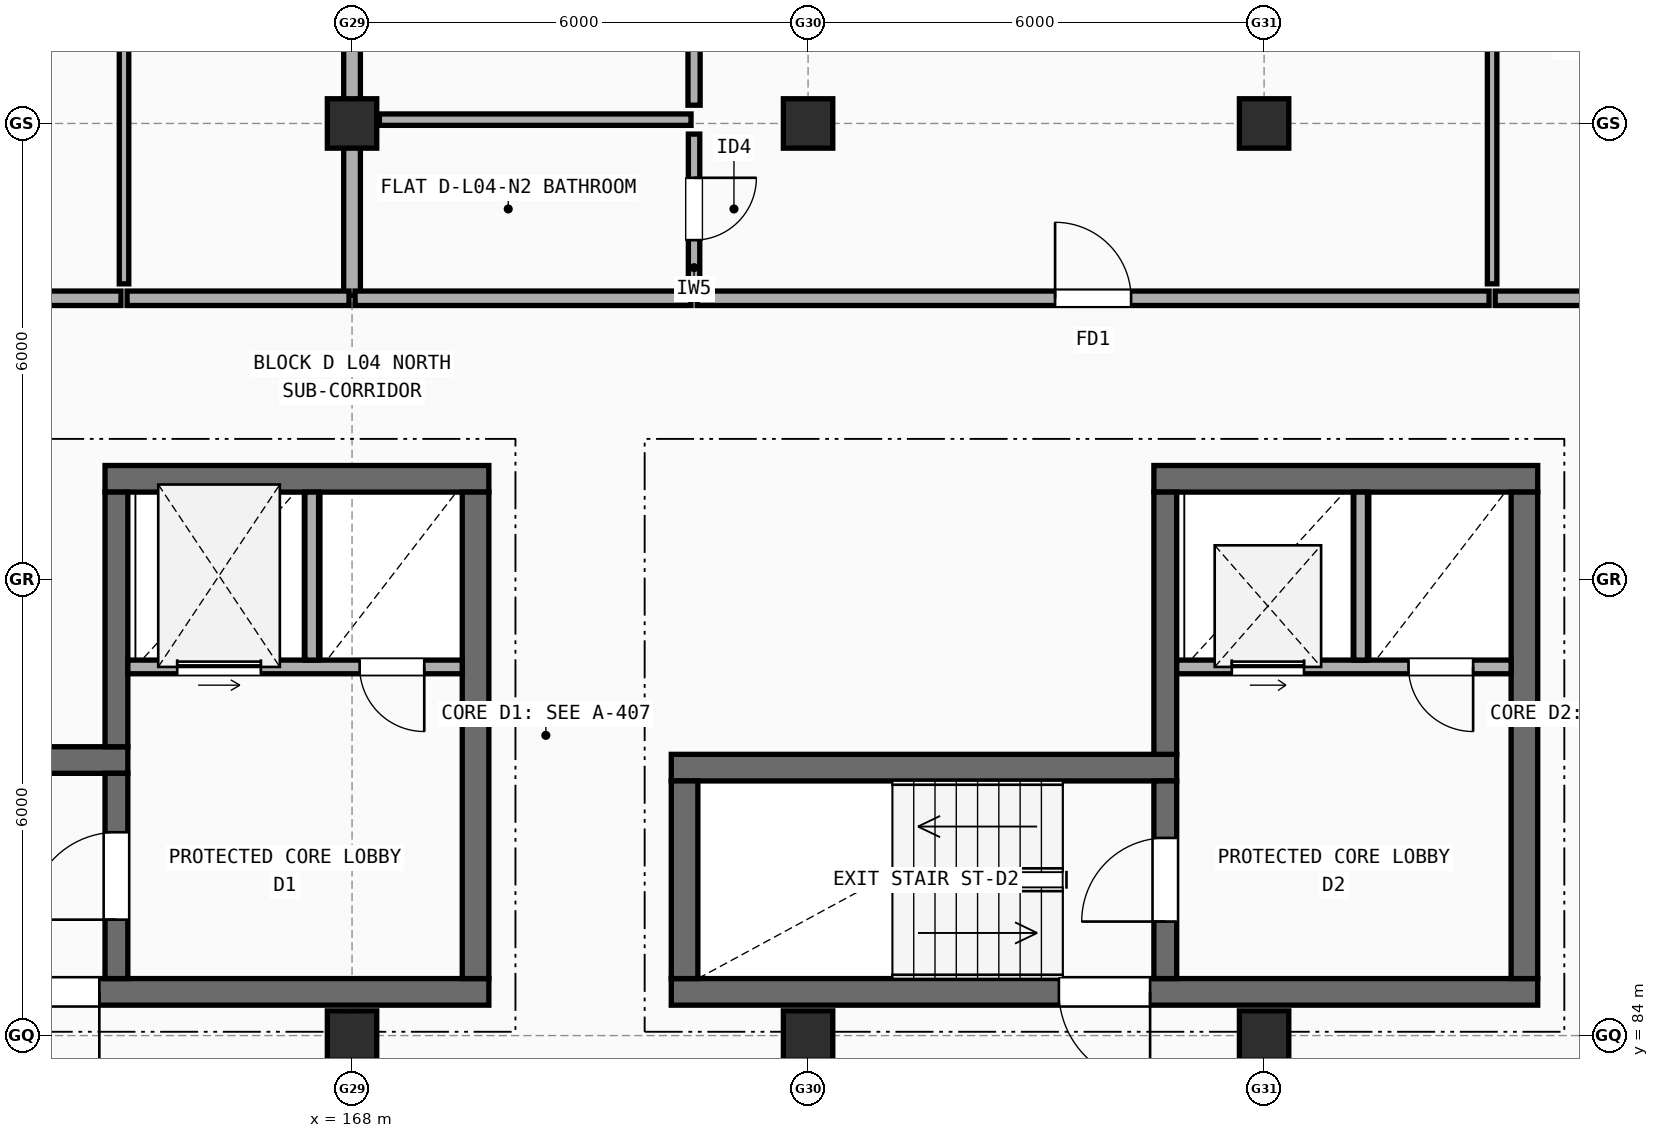
"""IFC4 building model, lengths in metres.
Left out: names, types, materials, properties, quantities, classifications, styles, units other than length and angle.
Written with IfcOpenShell. Run it as: python <this file> out.ifc"""

import sys

from ifc_helpers import new_model, si_unit, direction, frame, frame_2d, origin, origin_2d, place, context, subcontext, project, spatial, rectangle, extrude, element, fill, save


model = new_model("IFC4")
c1 = context("Model", 3, precision=1e-05, world=origin(), true_north=direction((0.0, 1.0)))
c2 = subcontext(c1, "Body", "Model", "MODEL_VIEW")
j1 = project(units=[si_unit("LENGTHUNIT", "METRE"), si_unit("PLANEANGLEUNIT", "RADIAN")], contexts=[c1])
p1 = place(None, origin())
s1 = spatial("IfcSite", under=j1, at=p1, CompositionType="ELEMENT")
p2 = place(p1, origin())
s2 = spatial("IfcBuilding", under=s1, at=p2, CompositionType="ELEMENT")
p3 = place(p2, frame((0.0, 0.0, 14.1)))
s3 = spatial("IfcBuildingStorey", under=s2, at=p3, CompositionType="ELEMENT", Elevation=14.1)
for number, where, z_axis, x_axis in (
    (1, (168.0, 84.0, 0.0), (0.0, 0.0, 1.0), (1.0, 0.0, 0.0)),
    (2, (168.0, 96.0, 0.0), (0.0, 0.0, 1.0), (1.0, 0.0, 0.0)),
    (3, (174.0, 84.0, 0.0), (0.0, 0.0, 1.0), (1.0, 0.0, 0.0)),
    (4, (174.0, 96.0, 0.0), (0.0, 0.0, 1.0), (1.0, 0.0, 0.0)),
    (5, (180.0, 84.0, 0.0), (0.0, 0.0, 1.0), (1.0, 0.0, 0.0)),
    (6, (180.0, 96.0, 0.0), (0.0, 0.0, 1.0), (1.0, 0.0, 0.0)),
):
    element("IfcColumn", number, at=place(p3, frame(where, z_axis=z_axis, x_axis=x_axis)), inside=s3, PredefinedType="COLUMN", context=c2, shape_type="SweptSolid", body=[
        extrude(rectangle(XDim=0.65, YDim=0.65, at=origin_2d()), origin(), (0.0, 0.0, 1.0), 2.95),
    ])
p4 = place(p3, frame((158.4, 84.575, 0.0), z_axis=(0.0, 0.0, 1.0), x_axis=(1.0, 0.0, 0.0)))
e7 = element("IfcWall", 7, at=p4, inside=s3, PredefinedType="SHEAR", context=c2, shape_type="SweptSolid", body=[
    extrude(rectangle(XDim=11.4, YDim=0.35, at=frame_2d((5.7, 0.0))), origin(), (0.0, 0.0, 1.0), 2.95),
])
p5 = place(p4, frame((5.125, 0.0, 0.0)))
e8 = element("IfcOpeningElement", 8, at=p5, cuts=e7, PredefinedType="OPENING", context=c2, shape_type="SweptSolid", body=[
    extrude(rectangle(XDim=1.15, YDim=2.15, at=frame_2d((0.575, 1.075))), frame((0.0, 0.185, 0.0), z_axis=(0.0, -1.0, 0.0), x_axis=(1.0, 0.0, 0.0)), (0.0, 0.0, 1.0), 0.37),
])
p6 = place(p3, frame((165.05, 87.625, 0.0), z_axis=(0.0, 0.0, 1.0), x_axis=(-1.0, 0.0, 0.0)))
e9 = element("IfcWall", 9, at=p6, inside=s3, PredefinedType="SHEAR", context=c2, shape_type="SweptSolid", body=[
    extrude(rectangle(XDim=6.65, YDim=0.35, at=frame_2d((3.325, 0.0))), origin(), (0.0, 0.0, 1.0), 2.95),
])
p7 = place(p3, frame((164.9, 84.75, 0.0), z_axis=(0.0, 0.0, 1.0), x_axis=(0.0, 1.0, 0.0)))
e10 = element("IfcWall", 10, at=p7, inside=s3, PredefinedType="SHEAR", context=c2, shape_type="SweptSolid", body=[
    extrude(rectangle(XDim=2.7, YDim=0.3, at=frame_2d((1.35, 0.0))), origin(), (0.0, 0.0, 1.0), 2.95),
])
p8 = place(p7, frame((0.775, 0.0, 0.0)))
e11 = element("IfcOpeningElement", 11, at=p8, cuts=e10, PredefinedType="OPENING", context=c2, shape_type="SweptSolid", body=[
    extrude(rectangle(XDim=1.15, YDim=2.15, at=frame_2d((0.575, 1.075))), frame((0.0, 0.16, 0.0), z_axis=(0.0, -1.0, 0.0), x_axis=(1.0, 0.0, 0.0)), (0.0, 0.0, 1.0), 0.32),
])
p9 = place(p3, frame((169.8, 91.325, 0.0), z_axis=(0.0, 0.0, 1.0), x_axis=(-1.0, 0.0, 0.0)))
e12 = element("IfcWall", 12, at=p9, inside=s3, PredefinedType="SHEAR", context=c2, shape_type="SweptSolid", body=[
    extrude(rectangle(XDim=5.05, YDim=0.35, at=frame_2d((2.525, 0.0))), origin(), (0.0, 0.0, 1.0), 2.95),
])
p10 = place(p3, frame((169.625, 84.75, 0.0), z_axis=(0.0, 0.0, 1.0), x_axis=(0.0, 1.0, 0.0)))
e13 = element("IfcWall", 13, at=p10, inside=s3, PredefinedType="SHEAR", context=c2, shape_type="SweptSolid", body=[
    extrude(rectangle(XDim=6.4, YDim=0.35, at=frame_2d((3.2, 0.0))), origin(), (0.0, 0.0, 1.0), 2.95),
])
p11 = place(p3, frame((164.9, 87.8, 0.0), z_axis=(0.0, 0.0, 1.0), x_axis=(0.0, 1.0, 0.0)))
e14 = element("IfcWall", 14, at=p11, inside=s3, PredefinedType="SHEAR", context=c2, shape_type="SweptSolid", body=[
    extrude(rectangle(XDim=3.35, YDim=0.3, at=frame_2d((1.675, 0.0))), origin(), (0.0, 0.0, 1.0), 2.95),
])
p12 = place(p3, frame((165.05, 88.85, 0.0), z_axis=(0.0, 0.0, 1.0), x_axis=(1.0, 0.0, 0.0)))
e15 = element("IfcWall", 15, at=p12, inside=s3, PredefinedType="SOLIDWALL", context=c2, shape_type="SweptSolid", body=[
    extrude(rectangle(XDim=4.4, YDim=0.18, at=frame_2d((2.2, 0.0))), origin(), (0.0, 0.0, 1.0), 2.95),
])
p13 = place(p12, frame((0.65, 0.0, 0.0)))
e16 = element("IfcOpeningElement", 16, at=p13, cuts=e15, PredefinedType="OPENING", context=c2, shape_type="SweptSolid", body=[
    extrude(rectangle(XDim=1.1, YDim=2.15, at=frame_2d((0.55, 1.075))), frame((0.0, 0.1, 0.0), z_axis=(0.0, -1.0, 0.0), x_axis=(1.0, 0.0, 0.0)), (0.0, 0.0, 1.0), 0.2),
])
p14 = place(p12, frame((3.05, 0.0, 0.0)))
e17 = element("IfcOpeningElement", 17, at=p14, cuts=e15, PredefinedType="OPENING", context=c2, shape_type="SweptSolid", body=[
    extrude(rectangle(XDim=0.85, YDim=2.1, at=frame_2d((0.425, 1.05))), frame((0.0, 0.1, 0.0), z_axis=(0.0, -1.0, 0.0), x_axis=(1.0, 0.0, 0.0)), (0.0, 0.0, 1.0), 0.2),
])
p15 = place(p3, frame((167.47, 88.94, 0.0), z_axis=(0.0, 0.0, 1.0), x_axis=(0.0, 1.0, 0.0)))
e18 = element("IfcWall", 18, at=p15, inside=s3, PredefinedType="SOLIDWALL", context=c2, shape_type="SweptSolid", body=[
    extrude(rectangle(XDim=2.21, YDim=0.18, at=frame_2d((1.105, 0.0))), origin(), (0.0, 0.0, 1.0), 2.95),
])
p16 = place(p3, frame((172.2, 84.575, 0.0), z_axis=(0.0, 0.0, 1.0), x_axis=(1.0, 0.0, 0.0)))
e19 = element("IfcWall", 19, at=p16, inside=s3, PredefinedType="SHEAR", context=c2, shape_type="SweptSolid", body=[
    extrude(rectangle(XDim=11.4, YDim=0.35, at=frame_2d((5.7, 0.0))), origin(), (0.0, 0.0, 1.0), 2.95),
])
p17 = place(p16, frame((5.1, 0.0, 0.0)))
e20 = element("IfcOpeningElement", 20, at=p17, cuts=e19, PredefinedType="OPENING", context=c2, shape_type="SweptSolid", body=[
    extrude(rectangle(XDim=1.2, YDim=2.15, at=frame_2d((0.6, 1.075))), frame((0.0, 0.185, 0.0), z_axis=(0.0, -1.0, 0.0), x_axis=(1.0, 0.0, 0.0)), (0.0, 0.0, 1.0), 0.37),
])
p18 = place(p3, frame((178.85, 87.525, 0.0), z_axis=(0.0, 0.0, 1.0), x_axis=(-1.0, 0.0, 0.0)))
e21 = element("IfcWall", 21, at=p18, inside=s3, PredefinedType="SHEAR", context=c2, shape_type="SweptSolid", body=[
    extrude(rectangle(XDim=6.65, YDim=0.35, at=frame_2d((3.325, 0.0))), origin(), (0.0, 0.0, 1.0), 2.95),
])
p19 = place(p3, frame((172.375, 87.35, 0.0), z_axis=(0.0, 0.0, 1.0), x_axis=(0.0, -1.0, 0.0)))
e22 = element("IfcWall", 22, at=p19, inside=s3, PredefinedType="SHEAR", context=c2, shape_type="SweptSolid", body=[
    extrude(rectangle(XDim=2.6, YDim=0.35, at=frame_2d((1.3, 0.0))), origin(), (0.0, 0.0, 1.0), 2.95),
])
p20 = place(p3, frame((178.7, 84.75, 0.0), z_axis=(0.0, 0.0, 1.0), x_axis=(0.0, 1.0, 0.0)))
e23 = element("IfcWall", 23, at=p20, inside=s3, PredefinedType="SHEAR", context=c2, shape_type="SweptSolid", body=[
    extrude(rectangle(XDim=2.6, YDim=0.3, at=frame_2d((1.3, 0.0))), origin(), (0.0, 0.0, 1.0), 2.95),
])
p21 = place(p20, frame((0.75, 0.0, 0.0)))
e24 = element("IfcOpeningElement", 24, at=p21, cuts=e23, PredefinedType="OPENING", context=c2, shape_type="SweptSolid", body=[
    extrude(rectangle(XDim=1.1, YDim=2.15, at=frame_2d((0.55, 1.075))), frame((0.0, 0.16, 0.0), z_axis=(0.0, -1.0, 0.0), x_axis=(1.0, 0.0, 0.0)), (0.0, 0.0, 1.0), 0.32),
])
p22 = place(p3, frame((183.6, 91.325, 0.0), z_axis=(0.0, 0.0, 1.0), x_axis=(-1.0, 0.0, 0.0)))
e25 = element("IfcWall", 25, at=p22, inside=s3, PredefinedType="SHEAR", context=c2, shape_type="SweptSolid", body=[
    extrude(rectangle(XDim=5.05, YDim=0.35, at=frame_2d((2.525, 0.0))), origin(), (0.0, 0.0, 1.0), 2.95),
])
p23 = place(p3, frame((183.425, 84.75, 0.0), z_axis=(0.0, 0.0, 1.0), x_axis=(0.0, 1.0, 0.0)))
e26 = element("IfcWall", 26, at=p23, inside=s3, PredefinedType="SHEAR", context=c2, shape_type="SweptSolid", body=[
    extrude(rectangle(XDim=6.4, YDim=0.35, at=frame_2d((3.2, 0.0))), origin(), (0.0, 0.0, 1.0), 2.95),
])
p24 = place(p3, frame((178.7, 87.7, 0.0), z_axis=(0.0, 0.0, 1.0), x_axis=(0.0, 1.0, 0.0)))
e27 = element("IfcWall", 27, at=p24, inside=s3, PredefinedType="SHEAR", context=c2, shape_type="SweptSolid", body=[
    extrude(rectangle(XDim=3.45, YDim=0.3, at=frame_2d((1.725, 0.0))), origin(), (0.0, 0.0, 1.0), 2.95),
])
p25 = place(p3, frame((178.85, 88.85, 0.0), z_axis=(0.0, 0.0, 1.0), x_axis=(1.0, 0.0, 0.0)))
e28 = element("IfcWall", 28, at=p25, inside=s3, PredefinedType="SOLIDWALL", context=c2, shape_type="SweptSolid", body=[
    extrude(rectangle(XDim=4.4, YDim=0.18, at=frame_2d((2.2, 0.0))), origin(), (0.0, 0.0, 1.0), 2.95),
])
p26 = place(p25, frame((0.725, 0.0, 0.0)))
e29 = element("IfcOpeningElement", 29, at=p26, cuts=e28, PredefinedType="OPENING", context=c2, shape_type="SweptSolid", body=[
    extrude(rectangle(XDim=0.95, YDim=2.15, at=frame_2d((0.475, 1.075))), frame((0.0, 0.1, 0.0), z_axis=(0.0, -1.0, 0.0), x_axis=(1.0, 0.0, 0.0)), (0.0, 0.0, 1.0), 0.2),
])
p27 = place(p25, frame((3.05, 0.0, 0.0)))
e30 = element("IfcOpeningElement", 30, at=p27, cuts=e28, PredefinedType="OPENING", context=c2, shape_type="SweptSolid", body=[
    extrude(rectangle(XDim=0.85, YDim=2.1, at=frame_2d((0.425, 1.05))), frame((0.0, 0.1, 0.0), z_axis=(0.0, -1.0, 0.0), x_axis=(1.0, 0.0, 0.0)), (0.0, 0.0, 1.0), 0.2),
])
p28 = place(p3, frame((181.27, 88.94, 0.0), z_axis=(0.0, 0.0, 1.0), x_axis=(0.0, 1.0, 0.0)))
e31 = element("IfcWall", 31, at=p28, inside=s3, PredefinedType="SOLIDWALL", context=c2, shape_type="SweptSolid", body=[
    extrude(rectangle(XDim=2.21, YDim=0.18, at=frame_2d((1.105, 0.0))), origin(), (0.0, 0.0, 1.0), 2.95),
])
p29 = place(p3, frame((168.0, 93.74, 0.0), z_axis=(0.0, 0.0, 1.0), x_axis=(0.0, 1.0, 0.0)))
e32 = element("IfcWall", 32, at=p29, inside=s3, PredefinedType="SOLIDWALL", context=c2, shape_type="SweptSolid", body=[
    extrude(rectangle(XDim=13.87, YDim=0.22, at=frame_2d((6.935, 0.0))), origin(), (0.0, 0.0, 1.0), 2.458),
])
p30 = place(p3, frame((154.54, 93.7, 0.0), z_axis=(0.0, 0.0, 1.0), x_axis=(1.0, 0.0, 0.0)))
e33 = element("IfcWall", 33, at=p30, inside=s3, PredefinedType="SOLIDWALL", context=c2, shape_type="SweptSolid", body=[
    extrude(rectangle(XDim=10.42, YDim=0.19, at=frame_2d((5.21, 0.0))), origin(), (0.0, 0.0, 1.0), 2.432),
])
p31 = place(p30, frame((4.72, 0.0, 0.0)))
e34 = element("IfcOpeningElement", 34, at=p31, cuts=e33, PredefinedType="OPENING", context=c2, shape_type="SweptSolid", body=[
    extrude(rectangle(XDim=0.98, YDim=2.15, at=frame_2d((0.49, 1.075))), frame((0.0, 0.105, 0.0), z_axis=(0.0, -1.0, 0.0), x_axis=(1.0, 0.0, 0.0)), (0.0, 0.0, 1.0), 0.21),
])
p32 = place(p3, frame((165.04, 93.7, 0.0), z_axis=(0.0, 0.0, 1.0), x_axis=(1.0, 0.0, 0.0)))
e35 = element("IfcWall", 35, at=p32, inside=s3, PredefinedType="SOLIDWALL", context=c2, shape_type="SweptSolid", body=[
    extrude(rectangle(XDim=2.92, YDim=0.19, at=frame_2d((1.46, 0.0))), origin(), (0.0, 0.0, 1.0), 2.508),
])
p33 = place(p3, frame((165.0, 93.89, 0.0), z_axis=(0.0, 0.0, 1.0), x_axis=(0.0, 1.0, 0.0)))
e36 = element("IfcWall", 36, at=p33, inside=s3, PredefinedType="PARTITIONING", context=c2, shape_type="SweptSolid", body=[
    extrude(rectangle(XDim=13.92, YDim=0.125, at=frame_2d((6.96, 0.0))), origin(), (0.0, 0.0, 1.0), 2.408),
])
p34 = place(p33, frame((6.65, 0.0, 0.0)))
e37 = element("IfcOpeningElement", 37, at=p34, cuts=e36, PredefinedType="OPENING", context=c2, shape_type="SweptSolid", body=[
    extrude(rectangle(XDim=0.9, YDim=2.1, at=frame_2d((0.45, 1.05))), frame((0.0, 0.073, 0.0), z_axis=(0.0, -1.0, 0.0), x_axis=(1.0, 0.0, 0.0)), (0.0, 0.0, 1.0), 0.145),
])
p35 = place(p3, frame((168.04, 93.7, 0.0), z_axis=(0.0, 0.0, 1.0), x_axis=(1.0, 0.0, 0.0)))
e38 = element("IfcWall", 38, at=p35, inside=s3, PredefinedType="SOLIDWALL", context=c2, shape_type="SweptSolid", body=[
    extrude(rectangle(XDim=4.42, YDim=0.19, at=frame_2d((2.21, 0.0))), origin(), (0.0, 0.0, 1.0), 2.508),
])
p36 = place(p3, frame((172.54, 93.7, 0.0), z_axis=(0.0, 0.0, 1.0), x_axis=(1.0, 0.0, 0.0)))
e39 = element("IfcWall", 39, at=p36, inside=s3, PredefinedType="SOLIDWALL", context=c2, shape_type="SweptSolid", body=[
    extrude(rectangle(XDim=10.42, YDim=0.19, at=frame_2d((5.21, 0.0))), origin(), (0.0, 0.0, 1.0), 2.95),
])
p37 = place(p36, frame((4.71, 0.0, 0.0)))
e40 = element("IfcOpeningElement", 40, at=p37, cuts=e39, PredefinedType="OPENING", context=c2, shape_type="SweptSolid", body=[
    extrude(rectangle(XDim=1.0, YDim=2.15, at=frame_2d((0.5, 1.075))), frame((0.0, 0.105, 0.0), z_axis=(0.0, -1.0, 0.0), x_axis=(1.0, 0.0, 0.0)), (0.0, 0.0, 1.0), 0.21),
])
p38 = place(p3, frame((172.5, 96.24, 0.0), z_axis=(0.0, 0.0, 1.0), x_axis=(0.0, 1.0, 0.0)))
e41 = element("IfcWall", 41, at=p38, inside=s3, PredefinedType="PLUMBINGWALL", context=c2, shape_type="SweptSolid", body=[
    extrude(rectangle(XDim=7.37, YDim=0.16, at=frame_2d((3.685, 0.0))), origin(), (0.0, 0.0, 1.0), 2.432),
])
p39 = place(p38, frame((3.245, 0.0, 0.0)))
e42 = element("IfcOpeningElement", 42, at=p39, cuts=e41, PredefinedType="OPENING", context=c2, shape_type="SweptSolid", body=[
    extrude(rectangle(XDim=0.88, YDim=2.1, at=frame_2d((0.44, 1.05))), frame((0.0, 0.09, 0.0), z_axis=(0.0, -1.0, 0.0), x_axis=(1.0, 0.0, 0.0)), (0.0, 0.0, 1.0), 0.18),
])
p40 = place(p3, frame((172.5, 93.89, 0.0), z_axis=(0.0, 0.0, 1.0), x_axis=(0.0, 1.0, 0.0)))
e43 = element("IfcWall", 43, at=p40, inside=s3, PredefinedType="PARTITIONING", context=c2, shape_type="SweptSolid", body=[
    extrude(rectangle(XDim=1.97, YDim=0.15, at=frame_2d((0.985, 0.0))), origin(), (0.0, 0.0, 1.0), 2.95),
])
p41 = place(p40, frame((0.575, 0.0, 0.0)))
e44 = element("IfcOpeningElement", 44, at=p41, cuts=e43, PredefinedType="OPENING", context=c2, shape_type="SweptSolid", body=[
    extrude(rectangle(XDim=0.82, YDim=2.08, at=frame_2d((0.41, 1.04))), frame((0.0, 0.085, 0.0), z_axis=(0.0, -1.0, 0.0), x_axis=(1.0, 0.0, 0.0)), (0.0, 0.0, 1.0), 0.17),
])
p42 = place(p3, frame((168.36, 96.05, 0.0), z_axis=(0.0, 0.0, 1.0), x_axis=(1.0, 0.0, 0.0)))
e45 = element("IfcWall", 45, at=p42, inside=s3, PredefinedType="PARTITIONING", context=c2, shape_type="SweptSolid", body=[
    extrude(rectangle(XDim=4.1, YDim=0.15, at=frame_2d((2.05, 0.0))), origin(), (0.0, 0.0, 1.0), 2.548),
])
p43 = place(p3, frame((183.04, 93.7, 0.0), z_axis=(0.0, 0.0, 1.0), x_axis=(1.0, 0.0, 0.0)))
e46 = element("IfcWall", 46, at=p43, inside=s3, PredefinedType="SOLIDWALL", context=c2, shape_type="SweptSolid", body=[
    extrude(rectangle(XDim=2.92, YDim=0.19, at=frame_2d((1.46, 0.0))), origin(), (0.0, 0.0, 1.0), 2.432),
])
p44 = place(p3, frame((183.0, 93.89, 0.0), z_axis=(0.0, 0.0, 1.0), x_axis=(0.0, 1.0, 0.0)))
e47 = element("IfcWall", 47, at=p44, inside=s3, PredefinedType="PARTITIONING", context=c2, shape_type="SweptSolid", body=[
    extrude(rectangle(XDim=13.92, YDim=0.125, at=frame_2d((6.96, 0.0))), origin(), (0.0, 0.0, 1.0), 2.408),
])
p45 = place(p44, frame((6.65, 0.0, 0.0)))
e48 = element("IfcOpeningElement", 48, at=p45, cuts=e47, PredefinedType="OPENING", context=c2, shape_type="SweptSolid", body=[
    extrude(rectangle(XDim=0.88, YDim=2.1, at=frame_2d((0.44, 1.05))), frame((0.0, 0.073, 0.0), z_axis=(0.0, -1.0, 0.0), x_axis=(1.0, 0.0, 0.0)), (0.0, 0.0, 1.0), 0.145),
])
p46 = place(p5, origin())
e49 = element("IfcDoor", 49, at=p46, inside=s3, OperationType="SINGLE_SWING_RIGHT", PredefinedType="DOOR", context=c2, shape_type="SweptSolid", body=[
    extrude(rectangle(XDim=1.15, YDim=2.15, at=frame_2d((0.575, 1.075))), frame((0.0, 0.025, 0.0), z_axis=(0.0, -1.0, 0.0), x_axis=(1.0, 0.0, 0.0)), (0.0, 0.0, 1.0), 0.05),
])
fill(e8, e49)
p47 = place(p8, origin())
e50 = element("IfcDoor", 50, at=p47, inside=s3, OperationType="SINGLE_SWING_LEFT", PredefinedType="DOOR", context=c2, shape_type="SweptSolid", body=[
    extrude(rectangle(XDim=1.15, YDim=2.15, at=frame_2d((0.575, 1.075))), frame((0.0, 0.025, 0.0), z_axis=(0.0, -1.0, 0.0), x_axis=(1.0, 0.0, 0.0)), (0.0, 0.0, 1.0), 0.05),
])
fill(e11, e50)
p48 = place(p13, origin())
e51 = element("IfcDoor", 51, at=p48, inside=s3, OperationType="SLIDING_TO_LEFT", PredefinedType="DOOR", context=c2, shape_type="SweptSolid", body=[
    extrude(rectangle(XDim=1.1, YDim=2.15, at=frame_2d((0.55, 1.075))), frame((0.0, 0.025, 0.0), z_axis=(0.0, -1.0, 0.0), x_axis=(1.0, 0.0, 0.0)), (0.0, 0.0, 1.0), 0.05),
])
fill(e16, e51)
p49 = place(p14, frame((0.85, 0.0, 0.0), z_axis=(0.0, 0.0, 1.0), x_axis=(-1.0, 0.0, 0.0)))
e52 = element("IfcDoor", 52, at=p49, inside=s3, OperationType="SINGLE_SWING_RIGHT", PredefinedType="DOOR", context=c2, shape_type="SweptSolid", body=[
    extrude(rectangle(XDim=0.85, YDim=2.1, at=frame_2d((0.425, 1.05))), frame((0.0, 0.025, 0.0), z_axis=(0.0, -1.0, 0.0), x_axis=(1.0, 0.0, 0.0)), (0.0, 0.0, 1.0), 0.05),
])
fill(e17, e52)
p50 = place(p17, origin())
e53 = element("IfcDoor", 53, at=p50, inside=s3, OperationType="SINGLE_SWING_RIGHT", PredefinedType="DOOR", context=c2, shape_type="SweptSolid", body=[
    extrude(rectangle(XDim=1.2, YDim=2.15, at=frame_2d((0.6, 1.075))), frame((0.0, 0.025, 0.0), z_axis=(0.0, -1.0, 0.0), x_axis=(1.0, 0.0, 0.0)), (0.0, 0.0, 1.0), 0.05),
])
fill(e20, e53)
p51 = place(p21, origin())
e54 = element("IfcDoor", 54, at=p51, inside=s3, OperationType="SINGLE_SWING_LEFT", PredefinedType="DOOR", context=c2, shape_type="SweptSolid", body=[
    extrude(rectangle(XDim=1.1, YDim=2.15, at=frame_2d((0.55, 1.075))), frame((0.0, 0.025, 0.0), z_axis=(0.0, -1.0, 0.0), x_axis=(1.0, 0.0, 0.0)), (0.0, 0.0, 1.0), 0.05),
])
fill(e24, e54)
p52 = place(p26, origin())
e55 = element("IfcDoor", 55, at=p52, inside=s3, OperationType="SLIDING_TO_LEFT", PredefinedType="DOOR", context=c2, shape_type="SweptSolid", body=[
    extrude(rectangle(XDim=0.95, YDim=2.15, at=frame_2d((0.475, 1.075))), frame((0.0, 0.025, 0.0), z_axis=(0.0, -1.0, 0.0), x_axis=(1.0, 0.0, 0.0)), (0.0, 0.0, 1.0), 0.05),
])
fill(e29, e55)
p53 = place(p27, frame((0.85, 0.0, 0.0), z_axis=(0.0, 0.0, 1.0), x_axis=(-1.0, 0.0, 0.0)))
e56 = element("IfcDoor", 56, at=p53, inside=s3, OperationType="SINGLE_SWING_RIGHT", PredefinedType="DOOR", context=c2, shape_type="SweptSolid", body=[
    extrude(rectangle(XDim=0.85, YDim=2.1, at=frame_2d((0.425, 1.05))), frame((0.0, 0.025, 0.0), z_axis=(0.0, -1.0, 0.0), x_axis=(1.0, 0.0, 0.0)), (0.0, 0.0, 1.0), 0.05),
])
fill(e30, e56)
p54 = place(p37, origin())
e57 = element("IfcDoor", 57, at=p54, inside=s3, OperationType="SINGLE_SWING_LEFT", PredefinedType="DOOR", context=c2, shape_type="SweptSolid", body=[
    extrude(rectangle(XDim=1.0, YDim=2.15, at=frame_2d((0.5, 1.075))), frame((0.0, 0.025, 0.0), z_axis=(0.0, -1.0, 0.0), x_axis=(1.0, 0.0, 0.0)), (0.0, 0.0, 1.0), 0.05),
])
fill(e40, e57)
p55 = place(p41, origin())
e58 = element("IfcDoor", 58, at=p55, inside=s3, OperationType="SINGLE_SWING_RIGHT", PredefinedType="DOOR", context=c2, shape_type="SweptSolid", body=[
    extrude(rectangle(XDim=0.82, YDim=2.08, at=frame_2d((0.41, 1.04))), frame((0.0, 0.025, 0.0), z_axis=(0.0, -1.0, 0.0), x_axis=(1.0, 0.0, 0.0)), (0.0, 0.0, 1.0), 0.05),
])
fill(e44, e58)
save(model, sys.argv[1])
